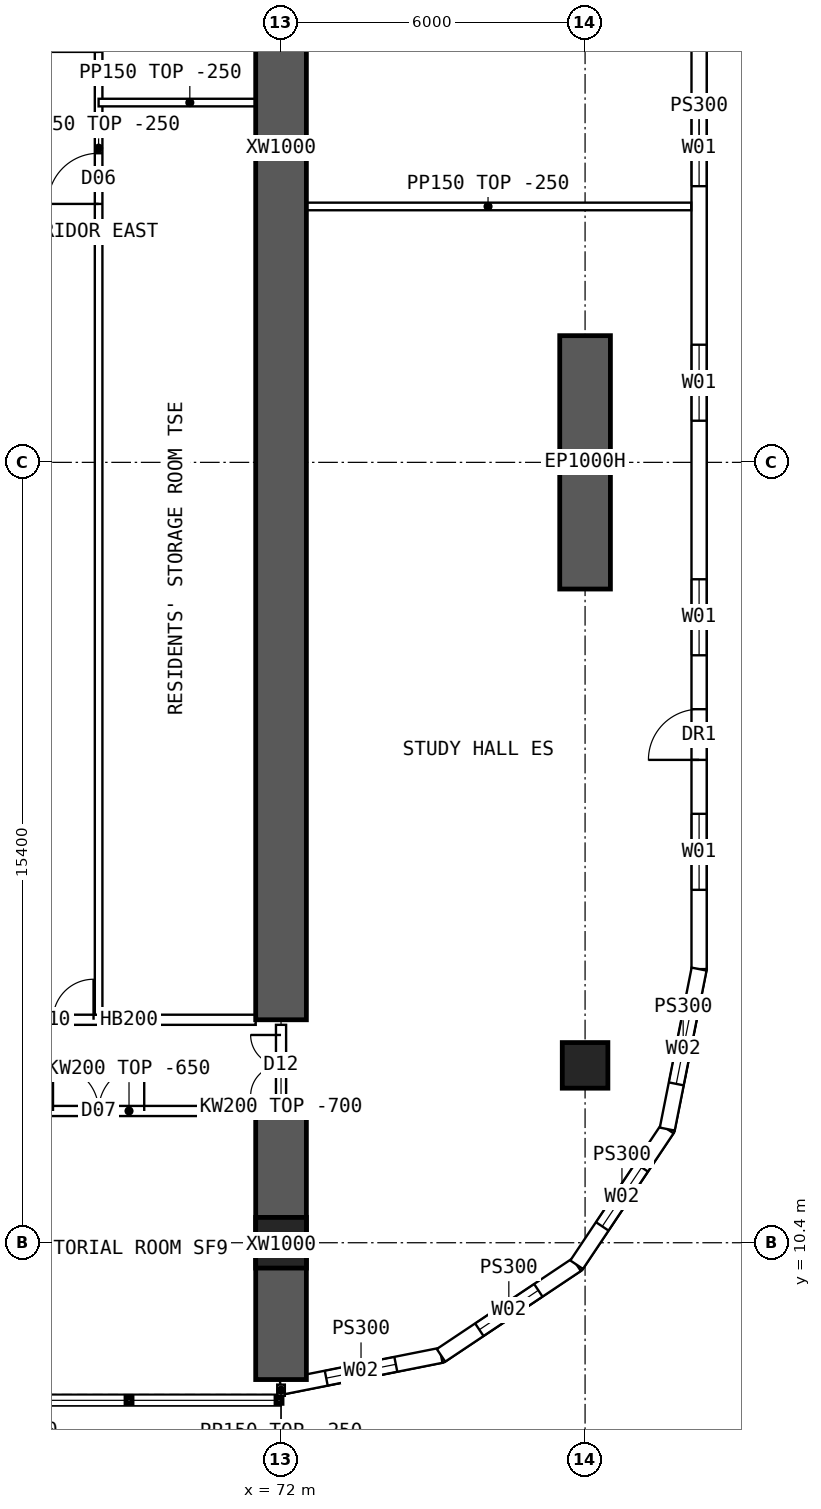
"""IFC4 building model, lengths in metres.
Left out: names, types, materials, properties, quantities, classifications, styles, units other than length and angle.
Written with IfcOpenShell. Run it as: python <this file> out.ifc"""

import sys

from ifc_helpers import new_model, si_unit, direction, frame, frame_2d, origin, origin_2d, place, context, subcontext, project, spatial, polyline, rectangle, hollow_rectangle, outline, extrude, element, fill, save


model = new_model("IFC4")
c1 = context("Model", 3, precision=1e-05, world=origin(), true_north=direction((0.0, 1.0)))
c2 = subcontext(c1, "Body", "Model", "MODEL_VIEW")
j1 = project(units=[si_unit("LENGTHUNIT", "METRE"), si_unit("PLANEANGLEUNIT", "RADIAN")], contexts=[c1])
p1 = place(None, origin())
s1 = spatial("IfcSite", under=j1, at=p1, CompositionType="ELEMENT")
p2 = place(p1, origin())
s2 = spatial("IfcBuilding", under=s1, at=p2, CompositionType="ELEMENT")
p3 = place(p2, frame((0.0, 0.0, 16.0)))
s3 = spatial("IfcBuildingStorey", under=s2, at=p3, CompositionType="ELEMENT", Elevation=16.0)
p4 = place(p3, frame((72.0, 10.4, 0.0), z_axis=(0.0, 0.0, 1.0), x_axis=(1.0, 0.0, 0.0)))
e1 = element("IfcColumn", 1, at=p4, inside=s3, PredefinedType="COLUMN", context=c2, shape_type="SweptSolid", body=[
    extrude(hollow_rectangle(XDim=1.0, YDim=1.0, WallThickness=0.1, at=origin_2d()), origin(), (0.0, 0.0, 1.0), 4.2),
])
p5 = place(p3, frame((78.0, 13.9, 0.0), z_axis=(0.0, 0.0, 1.0), x_axis=(1.0, 0.0, 0.0)))
e2 = element("IfcColumn", 2, at=p5, inside=s3, PredefinedType="COLUMN", context=c2, shape_type="SweptSolid", body=[
    extrude(hollow_rectangle(XDim=0.9, YDim=0.9, WallThickness=0.09, at=origin_2d()), origin(), (0.0, 0.0, 1.0), 4.2),
])
p6 = place(p3, frame((78.0, 23.3, 0.0), z_axis=(0.0, 0.0, 1.0), x_axis=(0.0, 1.0, 0.0)))
e3 = element("IfcWall", 3, at=p6, inside=s3, PredefinedType="SHEAR", context=c2, shape_type="SweptSolid", body=[
    extrude(rectangle(XDim=5.0, YDim=1.0, at=frame_2d((2.5, 0.0))), origin(), (0.0, 0.0, 1.0), 4.2),
])
p7 = place(p3, frame((72.0, 7.7, 0.0), z_axis=(0.0, 0.0, 1.0), x_axis=(0.0, 1.0, 0.0)))
e4 = element("IfcWall", 4, at=p7, inside=s3, PredefinedType="SHEAR", context=c2, shape_type="SweptSolid", body=[
    extrude(rectangle(XDim=5.3, YDim=1.0, at=frame_2d((2.65, 0.0))), origin(), (0.0, 0.0, 1.0), 4.2),
])
p8 = place(p3, frame((72.0, 14.8, 0.0), z_axis=(0.0, 0.0, 1.0), x_axis=(0.0, 1.0, 0.0)))
e5 = element("IfcWall", 5, at=p8, inside=s3, PredefinedType="SHEAR", context=c2, shape_type="SweptSolid", body=[
    extrude(rectangle(XDim=34.4, YDim=1.0, at=frame_2d((17.2, 0.0))), origin(), (0.0, 0.0, 1.0), 4.2),
])
p9 = place(p3, frame((80.25, 15.8, 0.0), z_axis=(0.0, 0.0, 1.0), x_axis=(0.0, 1.0, 0.0)))
e6 = element("IfcWall", 6, at=p9, inside=s3, PredefinedType="SOLIDWALL", context=c2, shape_type="SweptSolid", body=[
    extrude(outline(polyline([(-0.015, -0.15), (32.415, -0.15), (32.385, 0.15), (0.015, 0.15), (-0.015, -0.15)])), origin(), (0.0, 0.0, 1.0), 3.95),
])
p10 = place(p9, frame((1.564, 0.0, 0.9)))
e7 = element("IfcOpeningElement", 7, at=p10, cuts=e6, PredefinedType="OPENING", context=c2, shape_type="SweptSolid", body=[
    extrude(rectangle(XDim=1.5, YDim=2.0, at=frame_2d((0.75, 1.0))), frame((0.0, 0.16, 0.0), z_axis=(0.0, -1.0, 0.0), x_axis=(1.0, 0.0, 0.0)), (0.0, 0.0, 1.0), 0.32),
])
p11 = place(p9, frame((6.193, 0.0, 0.9)))
e8 = element("IfcOpeningElement", 8, at=p11, cuts=e6, PredefinedType="OPENING", context=c2, shape_type="SweptSolid", body=[
    extrude(rectangle(XDim=1.5, YDim=2.0, at=frame_2d((0.75, 1.0))), frame((0.0, 0.16, 0.0), z_axis=(0.0, -1.0, 0.0), x_axis=(1.0, 0.0, 0.0)), (0.0, 0.0, 1.0), 0.32),
])
p12 = place(p9, frame((10.822, 0.0, 0.9)))
e9 = element("IfcOpeningElement", 9, at=p12, cuts=e6, PredefinedType="OPENING", context=c2, shape_type="SweptSolid", body=[
    extrude(rectangle(XDim=1.5, YDim=2.0, at=frame_2d((0.75, 1.0))), frame((0.0, 0.16, 0.0), z_axis=(0.0, -1.0, 0.0), x_axis=(1.0, 0.0, 0.0)), (0.0, 0.0, 1.0), 0.32),
])
p13 = place(p9, frame((15.45, 0.0, 0.9)))
e10 = element("IfcOpeningElement", 10, at=p13, cuts=e6, PredefinedType="OPENING", context=c2, shape_type="SweptSolid", body=[
    extrude(rectangle(XDim=1.5, YDim=2.0, at=frame_2d((0.75, 1.0))), frame((0.0, 0.16, 0.0), z_axis=(0.0, -1.0, 0.0), x_axis=(1.0, 0.0, 0.0)), (0.0, 0.0, 1.0), 0.32),
])
p14 = place(p9, frame((20.079, 0.0, 0.9)))
e11 = element("IfcOpeningElement", 11, at=p14, cuts=e6, PredefinedType="OPENING", context=c2, shape_type="SweptSolid", body=[
    extrude(rectangle(XDim=1.5, YDim=2.0, at=frame_2d((0.75, 1.0))), frame((0.0, 0.16, 0.0), z_axis=(0.0, -1.0, 0.0), x_axis=(1.0, 0.0, 0.0)), (0.0, 0.0, 1.0), 0.32),
])
p15 = place(p9, frame((24.707, 0.0, 0.9)))
e12 = element("IfcOpeningElement", 12, at=p15, cuts=e6, PredefinedType="OPENING", context=c2, shape_type="SweptSolid", body=[
    extrude(rectangle(XDim=1.5, YDim=2.0, at=frame_2d((0.75, 1.0))), frame((0.0, 0.16, 0.0), z_axis=(0.0, -1.0, 0.0), x_axis=(1.0, 0.0, 0.0)), (0.0, 0.0, 1.0), 0.32),
])
p16 = place(p9, frame((29.336, 0.0, 0.9)))
e13 = element("IfcOpeningElement", 13, at=p16, cuts=e6, PredefinedType="OPENING", context=c2, shape_type="SweptSolid", body=[
    extrude(rectangle(XDim=1.5, YDim=2.0, at=frame_2d((0.75, 1.0))), frame((0.0, 0.16, 0.0), z_axis=(0.0, -1.0, 0.0), x_axis=(1.0, 0.0, 0.0)), (0.0, 0.0, 1.0), 0.32),
])
p17 = place(p9, frame((4.129, 0.0, 0.0)))
e14 = element("IfcOpeningElement", 14, at=p17, cuts=e6, PredefinedType="OPENING", context=c2, shape_type="SweptSolid", body=[
    extrude(rectangle(XDim=1.0, YDim=2.1, at=frame_2d((0.5, 1.05))), frame((0.0, 0.16, 0.0), z_axis=(0.0, -1.0, 0.0), x_axis=(1.0, 0.0, 0.0)), (0.0, 0.0, 1.0), 0.32),
])
p18 = place(p3, frame((72.0, 7.55, 0.0), z_axis=(0.0, 0.0, 1.0), x_axis=(0.980787251524, 0.195080412259, 0.0)))
e15 = element("IfcWall", 15, at=p18, inside=s3, PredefinedType="SOLIDWALL", context=c2, shape_type="SweptSolid", body=[
    extrude(outline(polyline([(-0.03, -0.15), (3.249, -0.15), (3.189, 0.15), (0.03, 0.15), (-0.03, -0.15)])), origin(), (0.0, 0.0, 1.0), 3.95),
])
p19 = place(p18, frame((0.909, 0.0, 0.9)))
e16 = element("IfcOpeningElement", 16, at=p19, cuts=e15, PredefinedType="OPENING", context=c2, shape_type="SweptSolid", body=[
    extrude(rectangle(XDim=1.4, YDim=1.8, at=frame_2d((0.7, 0.9))), frame((0.0, 0.16, 0.0), z_axis=(0.0, -1.0, 0.0), x_axis=(1.0, 0.0, 0.0)), (0.0, 0.0, 1.0), 0.32),
])
p20 = place(p3, frame((75.157, 8.178, 0.0), z_axis=(0.0, 0.0, 1.0), x_axis=(0.831478105043, 0.555557522525, 0.0)))
e17 = element("IfcWall", 17, at=p20, inside=s3, PredefinedType="SOLIDWALL", context=c2, shape_type="SweptSolid", body=[
    extrude(outline(polyline([(-0.03, -0.15), (3.249, -0.15), (3.189, 0.15), (0.03, 0.15), (-0.03, -0.15)])), origin(), (0.0, 0.0, 1.0), 3.95),
])
p21 = place(p20, frame((0.909, 0.0, 0.9)))
e18 = element("IfcOpeningElement", 18, at=p21, cuts=e17, PredefinedType="OPENING", context=c2, shape_type="SweptSolid", body=[
    extrude(rectangle(XDim=1.4, YDim=1.8, at=frame_2d((0.7, 0.9))), frame((0.0, 0.16, 0.0), z_axis=(0.0, -1.0, 0.0), x_axis=(1.0, 0.0, 0.0)), (0.0, 0.0, 1.0), 0.32),
])
p22 = place(p3, frame((77.833, 9.966, 0.0), z_axis=(0.0, 0.0, 1.0), x_axis=(0.555609954424, 0.831443069936, 0.0)))
e19 = element("IfcWall", 19, at=p22, inside=s3, PredefinedType="SOLIDWALL", context=c2, shape_type="SweptSolid", body=[
    extrude(outline(polyline([(-0.03, -0.15), (3.249, -0.15), (3.189, 0.15), (0.03, 0.15), (-0.03, -0.15)])), origin(), (0.0, 0.0, 1.0), 3.95),
])
p23 = place(p22, frame((0.909, 0.0, 0.9)))
e20 = element("IfcOpeningElement", 20, at=p23, cuts=e19, PredefinedType="OPENING", context=c2, shape_type="SweptSolid", body=[
    extrude(rectangle(XDim=1.4, YDim=1.8, at=frame_2d((0.7, 0.9))), frame((0.0, 0.16, 0.0), z_axis=(0.0, -1.0, 0.0), x_axis=(1.0, 0.0, 0.0)), (0.0, 0.0, 1.0), 0.32),
])
p24 = place(p3, frame((79.622, 12.643, 0.0), z_axis=(0.0, 0.0, 1.0), x_axis=(0.195065901187, 0.980790137692, 0.0)))
e21 = element("IfcWall", 21, at=p24, inside=s3, PredefinedType="SOLIDWALL", context=c2, shape_type="SweptSolid", body=[
    extrude(outline(polyline([(-0.03, -0.15), (3.234, -0.15), (3.204, 0.15), (0.03, 0.15), (-0.03, -0.15)])), origin(), (0.0, 0.0, 1.0), 3.95),
])
p25 = place(p24, frame((0.909, 0.0, 0.9)))
e22 = element("IfcOpeningElement", 22, at=p25, cuts=e21, PredefinedType="OPENING", context=c2, shape_type="SweptSolid", body=[
    extrude(rectangle(XDim=1.4, YDim=1.8, at=frame_2d((0.7, 0.9))), frame((0.0, 0.16, 0.0), z_axis=(0.0, -1.0, 0.0), x_axis=(1.0, 0.0, 0.0)), (0.0, 0.0, 1.0), 0.32),
])
p26 = place(p3, frame((66.5, 13.0, 0.0), z_axis=(0.0, 0.0, 1.0), x_axis=(1.0, 0.0, 0.0)))
e23 = element("IfcWall", 23, at=p26, inside=s3, PredefinedType="SOLIDWALL", context=c2, shape_type="SweptSolid", body=[
    extrude(outline(polyline([(0.0, 0.0), (5.0, 0.0), (5.0, 3.55), (0.0, 3.55), (0.0, 0.0)])), frame((0.0, 0.1, 0.0), z_axis=(0.0, -1.0, 0.0), x_axis=(1.0, 0.0, 0.0)), (0.0, 0.0, 1.0), 0.2),
])
p27 = place(p26, frame((1.0, 0.0, 0.0)))
e24 = element("IfcOpeningElement", 24, at=p27, cuts=e23, PredefinedType="OPENING", context=c2, shape_type="SweptSolid", body=[
    extrude(rectangle(XDim=1.8, YDim=2.1, at=frame_2d((0.9, 1.05))), frame((0.0, 0.11, 0.0), z_axis=(0.0, -1.0, 0.0), x_axis=(1.0, 0.0, 0.0)), (0.0, 0.0, 1.0), 0.22),
])
p28 = place(p3, frame((66.5, 14.8, 0.0), z_axis=(0.0, 0.0, 1.0), x_axis=(1.0, 0.0, 0.0)))
e25 = element("IfcWall", 25, at=p28, inside=s3, PredefinedType="SOLIDWALL", context=c2, shape_type="SweptSolid", body=[
    extrude(rectangle(XDim=5.0, YDim=0.2, at=frame_2d((2.5, 0.0))), origin(), (0.0, 0.0, 1.0), 3.95),
])
p29 = place(p28, frame((0.2, 0.0, 0.0)))
e26 = element("IfcOpeningElement", 26, at=p29, cuts=e25, PredefinedType="OPENING", context=c2, shape_type="SweptSolid", body=[
    extrude(rectangle(XDim=1.6, YDim=2.1, at=frame_2d((0.8, 1.05))), frame((0.0, 0.11, 0.0), z_axis=(0.0, -1.0, 0.0), x_axis=(1.0, 0.0, 0.0)), (0.0, 0.0, 1.0), 0.22),
])
p30 = place(p3, frame((68.4, 14.9, 0.0), z_axis=(0.0, 0.0, 1.0), x_axis=(0.0, 1.0, 0.0)))
e27 = element("IfcWall", 27, at=p30, inside=s3, PredefinedType="PARTITIONING", context=c2, shape_type="SweptSolid", body=[
    extrude(rectangle(XDim=34.2, YDim=0.15, at=frame_2d((17.1, 0.0))), origin(), (0.0, 0.0, 1.0), 3.95),
])
p31 = place(p30, frame((16.0, 0.0, 0.0)))
e28 = element("IfcOpeningElement", 28, at=p31, cuts=e27, PredefinedType="OPENING", context=c2, shape_type="SweptSolid", body=[
    extrude(rectangle(XDim=1.0, YDim=2.1, at=frame_2d((0.5, 1.05))), frame((0.0, 0.085, 0.0), z_axis=(0.0, -1.0, 0.0), x_axis=(1.0, 0.0, 0.0)), (0.0, 0.0, 1.0), 0.17),
])
p32 = place(p30, frame((19.0, 0.0, 0.0)))
e29 = element("IfcOpeningElement", 29, at=p32, cuts=e27, PredefinedType="OPENING", context=c2, shape_type="SweptSolid", body=[
    extrude(rectangle(XDim=1.0, YDim=2.1, at=frame_2d((0.5, 1.05))), frame((0.0, 0.085, 0.0), z_axis=(0.0, -1.0, 0.0), x_axis=(1.0, 0.0, 0.0)), (0.0, 0.0, 1.0), 0.17),
])
p33 = place(p3, frame((68.4, 32.9, 0.0), z_axis=(0.0, 0.0, 1.0), x_axis=(1.0, 0.0, 0.0)))
e30 = element("IfcWall", 30, at=p33, inside=s3, PredefinedType="PARTITIONING", context=c2, shape_type="SweptSolid", body=[
    extrude(rectangle(XDim=3.6, YDim=0.15, at=frame_2d((1.8, 0.0))), origin(), (0.0, 0.0, 1.0), 3.95),
])
p34 = place(p3, frame((72.075, 30.85, 0.0), z_axis=(0.0, 0.0, 1.0), x_axis=(1.0, 0.0, 0.0)))
e31 = element("IfcWall", 31, at=p34, inside=s3, PredefinedType="PARTITIONING", context=c2, shape_type="SweptSolid", body=[
    extrude(outline(polyline([(0.0, 0.0), (8.02, 0.0), (8.02, 3.95), (6.227, 3.95), (6.225, 3.5), (5.627, 3.5), (5.625, 3.95), (0.0, 3.95), (0.0, 0.0)])), frame((0.0, 0.075, 0.0), z_axis=(0.0, -1.0, 0.0), x_axis=(1.0, 0.0, 0.0)), (0.0, 0.0, 1.0), 0.15),
])
p35 = place(p3, frame((72.0, 13.1, 0.0), z_axis=(0.0, 0.0, 1.0), x_axis=(0.0, 1.0, 0.0)))
e32 = element("IfcWall", 32, at=p35, inside=s3, PredefinedType="SOLIDWALL", context=c2, shape_type="SweptSolid", body=[
    extrude(outline(polyline([(0.0, 0.0), (1.6, 0.0), (1.6, 3.5), (0.0, 3.5), (0.0, 0.0)])), frame((0.0, 0.1, 0.0), z_axis=(0.0, -1.0, 0.0), x_axis=(1.0, 0.0, 0.0)), (0.0, 0.0, 1.0), 0.2),
])
p36 = place(p35, frame((0.2, 0.0, 0.0)))
e33 = element("IfcOpeningElement", 33, at=p36, cuts=e32, PredefinedType="OPENING", context=c2, shape_type="SweptSolid", body=[
    extrude(rectangle(XDim=1.2, YDim=2.1, at=frame_2d((0.6, 1.05))), frame((0.0, 0.11, 0.0), z_axis=(0.0, -1.0, 0.0), x_axis=(1.0, 0.0, 0.0)), (0.0, 0.0, 1.0), 0.22),
])
p37 = place(p3, frame((72.0, 7.6, 0.0), z_axis=(0.0, 0.0, 1.0), x_axis=(0.0, -1.0, 0.0)))
e34 = element("IfcWall", 34, at=p37, inside=s3, PredefinedType="PARTITIONING", context=c2, shape_type="SweptSolid", body=[
    extrude(rectangle(XDim=0.22, YDim=0.15, at=frame_2d((0.11, 0.0))), origin(), (0.0, 0.0, 1.0), 3.95),
])
p38 = place(p10, origin())
e35 = element("IfcWindow", 35, at=p38, inside=s3, PartitioningType="SINGLE_PANEL", PredefinedType="WINDOW", context=c2, shape_type="SweptSolid", body=[
    extrude(rectangle(XDim=1.5, YDim=2.0, at=frame_2d((0.75, 1.0))), frame((0.0, 0.03, 0.0), z_axis=(0.0, -1.0, 0.0), x_axis=(1.0, 0.0, 0.0)), (0.0, 0.0, 1.0), 0.06),
])
fill(e7, e35)
p39 = place(p11, origin())
e36 = element("IfcWindow", 36, at=p39, inside=s3, PartitioningType="SINGLE_PANEL", PredefinedType="WINDOW", context=c2, shape_type="SweptSolid", body=[
    extrude(rectangle(XDim=1.5, YDim=2.0, at=frame_2d((0.75, 1.0))), frame((0.0, 0.03, 0.0), z_axis=(0.0, -1.0, 0.0), x_axis=(1.0, 0.0, 0.0)), (0.0, 0.0, 1.0), 0.06),
])
fill(e8, e36)
p40 = place(p12, origin())
e37 = element("IfcWindow", 37, at=p40, inside=s3, PartitioningType="SINGLE_PANEL", PredefinedType="WINDOW", context=c2, shape_type="SweptSolid", body=[
    extrude(rectangle(XDim=1.5, YDim=2.0, at=frame_2d((0.75, 1.0))), frame((0.0, 0.03, 0.0), z_axis=(0.0, -1.0, 0.0), x_axis=(1.0, 0.0, 0.0)), (0.0, 0.0, 1.0), 0.06),
])
fill(e9, e37)
p41 = place(p13, origin())
e38 = element("IfcWindow", 38, at=p41, inside=s3, PartitioningType="SINGLE_PANEL", PredefinedType="WINDOW", context=c2, shape_type="SweptSolid", body=[
    extrude(rectangle(XDim=1.5, YDim=2.0, at=frame_2d((0.75, 1.0))), frame((0.0, 0.03, 0.0), z_axis=(0.0, -1.0, 0.0), x_axis=(1.0, 0.0, 0.0)), (0.0, 0.0, 1.0), 0.06),
])
fill(e10, e38)
p42 = place(p17, origin())
e39 = element("IfcDoor", 39, at=p42, inside=s3, OperationType="SINGLE_SWING_LEFT", PredefinedType="DOOR", context=c2, shape_type="SweptSolid", body=[
    extrude(rectangle(XDim=1.0, YDim=2.1, at=frame_2d((0.5, 1.05))), frame((0.0, 0.025, 0.0), z_axis=(0.0, -1.0, 0.0), x_axis=(1.0, 0.0, 0.0)), (0.0, 0.0, 1.0), 0.05),
])
fill(e14, e39)
p43 = place(p19, origin())
e40 = element("IfcWindow", 40, at=p43, inside=s3, PartitioningType="SINGLE_PANEL", PredefinedType="WINDOW", context=c2, shape_type="SweptSolid", body=[
    extrude(rectangle(XDim=1.4, YDim=1.8, at=frame_2d((0.7, 0.9))), frame((0.0, 0.03, 0.0), z_axis=(0.0, -1.0, 0.0), x_axis=(1.0, 0.0, 0.0)), (0.0, 0.0, 1.0), 0.06),
])
fill(e16, e40)
p44 = place(p21, origin())
e41 = element("IfcWindow", 41, at=p44, inside=s3, PartitioningType="SINGLE_PANEL", PredefinedType="WINDOW", context=c2, shape_type="SweptSolid", body=[
    extrude(rectangle(XDim=1.4, YDim=1.8, at=frame_2d((0.7, 0.9))), frame((0.0, 0.03, 0.0), z_axis=(0.0, -1.0, 0.0), x_axis=(1.0, 0.0, 0.0)), (0.0, 0.0, 1.0), 0.06),
])
fill(e18, e41)
p45 = place(p23, origin())
e42 = element("IfcWindow", 42, at=p45, inside=s3, PartitioningType="SINGLE_PANEL", PredefinedType="WINDOW", context=c2, shape_type="SweptSolid", body=[
    extrude(rectangle(XDim=1.4, YDim=1.8, at=frame_2d((0.7, 0.9))), frame((0.0, 0.03, 0.0), z_axis=(0.0, -1.0, 0.0), x_axis=(1.0, 0.0, 0.0)), (0.0, 0.0, 1.0), 0.06),
])
fill(e20, e42)
p46 = place(p25, origin())
e43 = element("IfcWindow", 43, at=p46, inside=s3, PartitioningType="SINGLE_PANEL", PredefinedType="WINDOW", context=c2, shape_type="SweptSolid", body=[
    extrude(rectangle(XDim=1.4, YDim=1.8, at=frame_2d((0.7, 0.9))), frame((0.0, 0.03, 0.0), z_axis=(0.0, -1.0, 0.0), x_axis=(1.0, 0.0, 0.0)), (0.0, 0.0, 1.0), 0.06),
])
fill(e22, e43)
p47 = place(p29, origin())
e44 = element("IfcDoor", 44, at=p47, inside=s3, OperationType="DOUBLE_DOOR_SINGLE_SWING", PredefinedType="DOOR", context=c2, shape_type="SweptSolid", body=[
    extrude(rectangle(XDim=1.6, YDim=2.1, at=frame_2d((0.8, 1.05))), frame((0.0, 0.025, 0.0), z_axis=(0.0, -1.0, 0.0), x_axis=(1.0, 0.0, 0.0)), (0.0, 0.0, 1.0), 0.05),
])
fill(e26, e44)
p48 = place(p27, origin())
e45 = element("IfcDoor", 45, at=p48, inside=s3, OperationType="DOUBLE_DOOR_SINGLE_SWING", PredefinedType="DOOR", context=c2, shape_type="SweptSolid", body=[
    extrude(rectangle(XDim=1.8, YDim=2.1, at=frame_2d((0.9, 1.05))), frame((0.0, 0.025, 0.0), z_axis=(0.0, -1.0, 0.0), x_axis=(1.0, 0.0, 0.0)), (0.0, 0.0, 1.0), 0.05),
])
fill(e24, e45)
p49 = place(p31, origin())
e46 = element("IfcDoor", 46, at=p49, inside=s3, OperationType="SINGLE_SWING_LEFT", PredefinedType="DOOR", context=c2, shape_type="SweptSolid", body=[
    extrude(rectangle(XDim=1.0, YDim=2.1, at=frame_2d((0.5, 1.05))), frame((0.0, 0.025, 0.0), z_axis=(0.0, -1.0, 0.0), x_axis=(1.0, 0.0, 0.0)), (0.0, 0.0, 1.0), 0.05),
])
fill(e28, e46)
p50 = place(p36, origin())
e47 = element("IfcDoor", 47, at=p50, inside=s3, OperationType="DOUBLE_DOOR_SINGLE_SWING", PredefinedType="DOOR", context=c2, shape_type="SweptSolid", body=[
    extrude(rectangle(XDim=1.2, YDim=2.1, at=frame_2d((0.6, 1.05))), frame((0.0, 0.025, 0.0), z_axis=(0.0, -1.0, 0.0), x_axis=(1.0, 0.0, 0.0)), (0.0, 0.0, 1.0), 0.05),
])
fill(e33, e47)
save(model, sys.argv[1])
